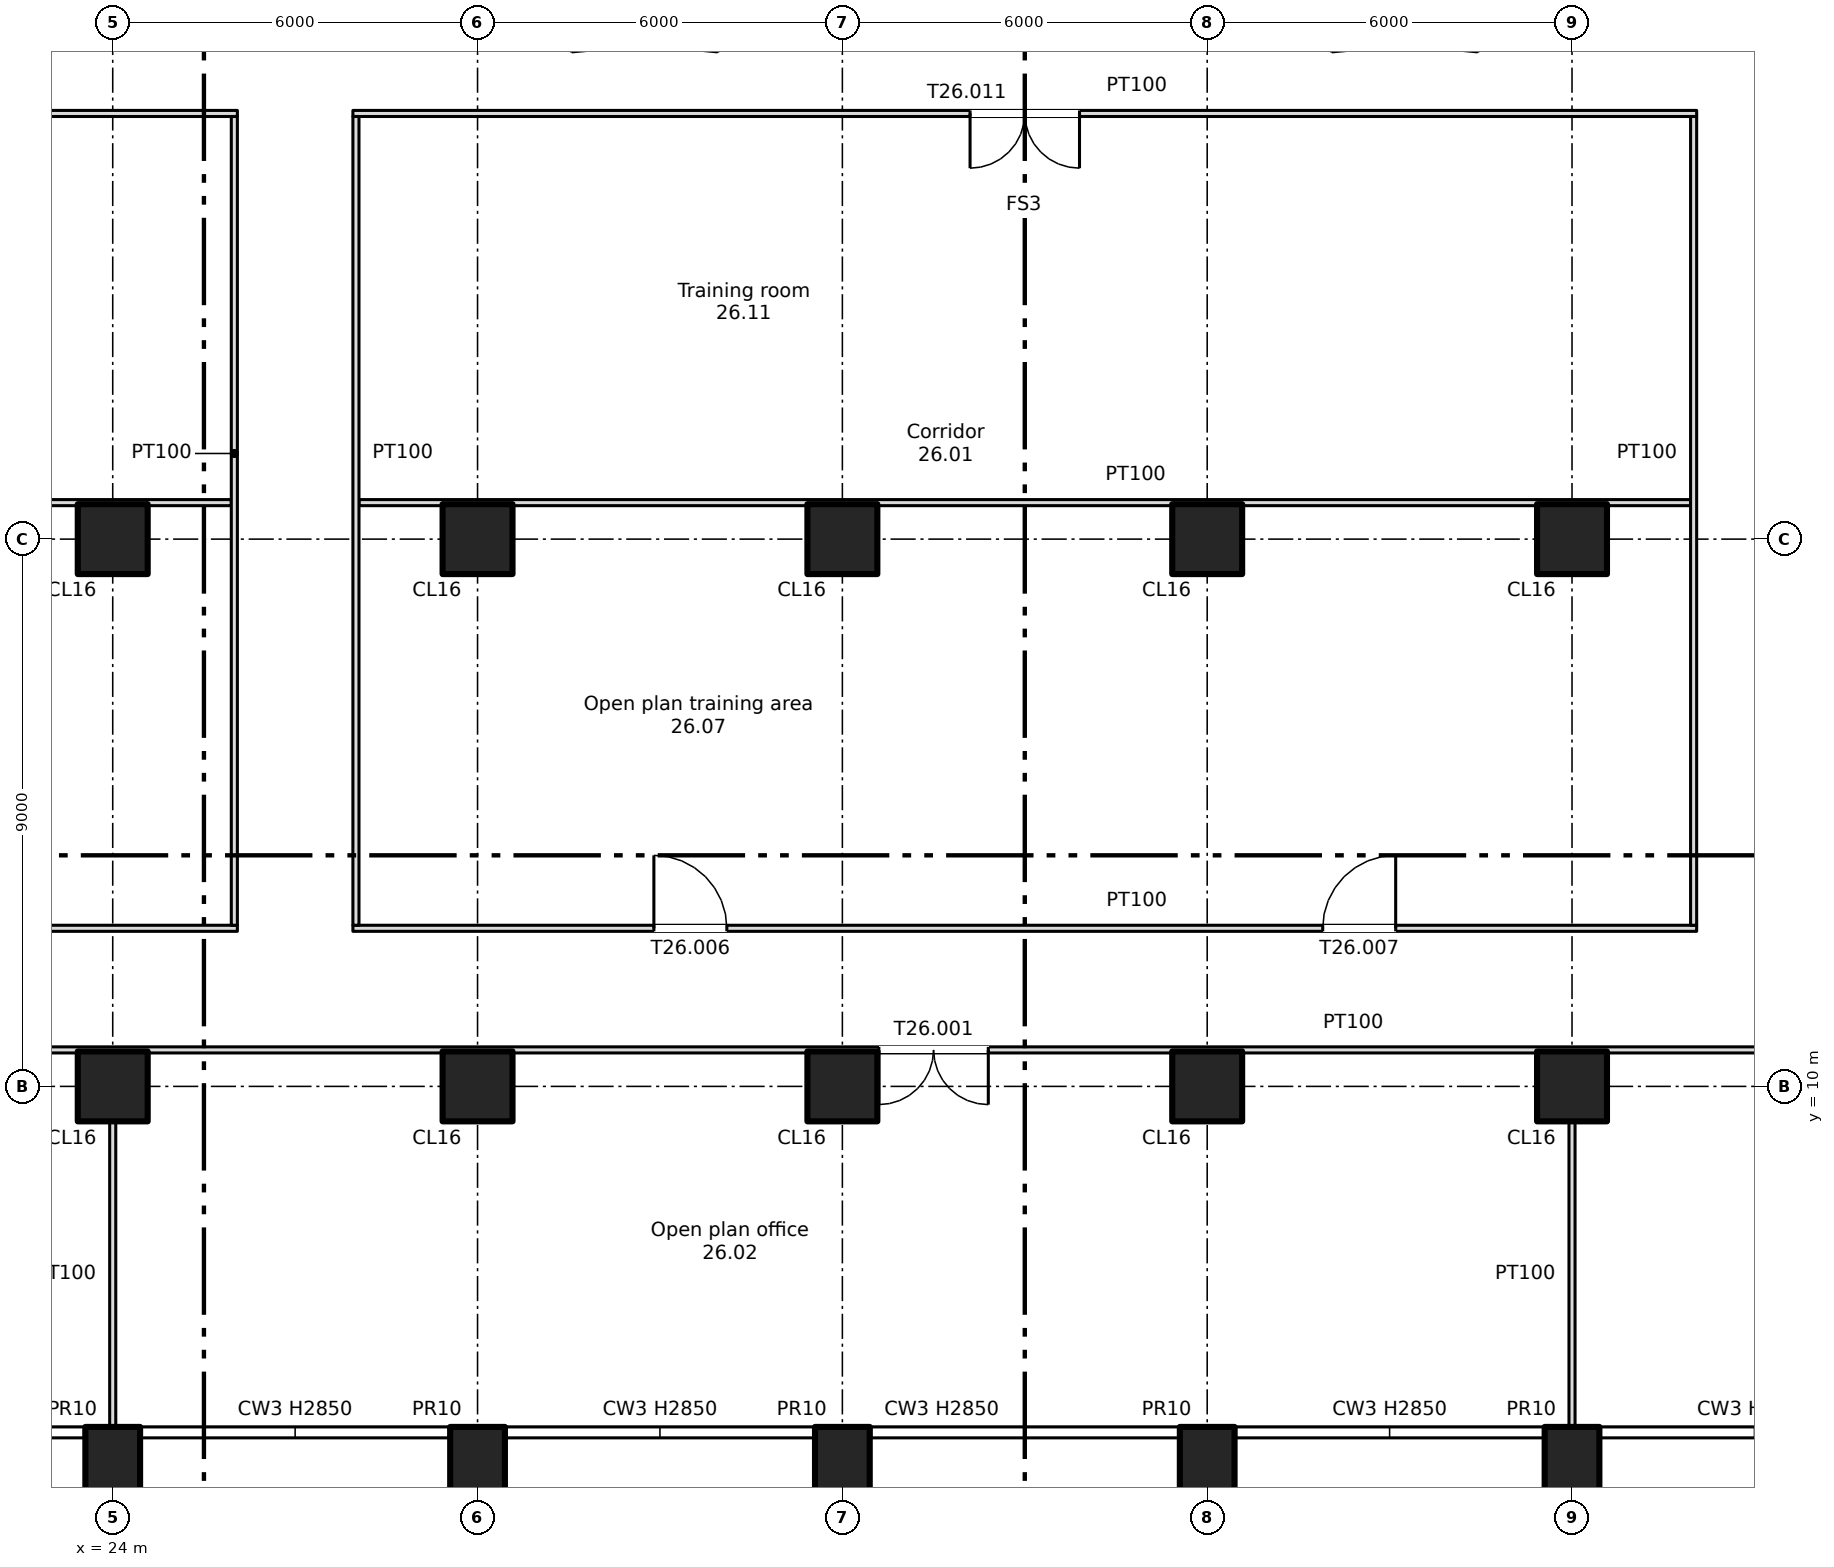
"""IFC4 building model, lengths in metres.
Left out: names, types, materials, properties, quantities, classifications, styles, units other than length and angle.
Written with IfcOpenShell. Run it as: python <this file> out.ifc"""

import sys

from ifc_helpers import new_model, si_unit, direction, frame, frame_2d, origin, origin_2d, place, context, subcontext, project, spatial, rectangle, extrude, element, fill, save


model = new_model("IFC4")
c1 = context("Model", 3, precision=1e-05, world=origin(), true_north=direction((0.0, 1.0)))
c2 = subcontext(c1, "Body", "Model", "MODEL_VIEW")
j1 = project(units=[si_unit("LENGTHUNIT", "METRE"), si_unit("PLANEANGLEUNIT", "RADIAN")], contexts=[c1])
p1 = place(None, origin())
s1 = spatial("IfcSite", under=j1, at=p1, CompositionType="ELEMENT")
p2 = place(p1, origin())
s2 = spatial("IfcBuilding", under=s1, at=p2, CompositionType="ELEMENT")
p3 = place(p2, frame((0.0, 0.0, 181.75)))
s3 = spatial("IfcBuildingStorey", under=s2, at=p3, CompositionType="ELEMENT", Elevation=181.75)
for number, where, z_axis, x_axis in (
    (1, (24.0, 3.7, -0.4), (0.0, 0.0, 1.0), (1.0, 0.0, 0.0)),
    (2, (30.0, 3.7, -0.4), (0.0, 0.0, 1.0), (1.0, 0.0, 0.0)),
    (3, (36.0, 3.7, -0.4), (0.0, 0.0, 1.0), (1.0, 0.0, 0.0)),
    (4, (42.0, 3.7, -0.4), (0.0, 0.0, 1.0), (1.0, 0.0, 0.0)),
    (5, (48.0, 3.7, -0.4), (0.0, 0.0, 1.0), (1.0, 0.0, 0.0)),
):
    element("IfcColumn", number, at=place(p3, frame(where, z_axis=z_axis, x_axis=x_axis)), inside=s3, PredefinedType="COLUMN", context=c2, shape_type="SweptSolid", body=[
        extrude(rectangle(XDim=0.9, YDim=1.4, at=origin_2d()), origin(), (0.0, 0.0, 1.0), 3.75),
    ])
for number, where, z_axis, x_axis in (
    (6, (24.0, 10.0, 0.0), (0.0, 0.0, 1.0), (1.0, 0.0, 0.0)),
    (7, (24.0, 19.0, 0.0), (0.0, 0.0, 1.0), (1.0, 0.0, 0.0)),
    (8, (30.0, 10.0, 0.0), (0.0, 0.0, 1.0), (1.0, 0.0, 0.0)),
    (9, (30.0, 19.0, 0.0), (0.0, 0.0, 1.0), (1.0, 0.0, 0.0)),
    (10, (36.0, 10.0, 0.0), (0.0, 0.0, 1.0), (1.0, 0.0, 0.0)),
    (11, (36.0, 19.0, 0.0), (0.0, 0.0, 1.0), (1.0, 0.0, 0.0)),
    (12, (42.0, 10.0, 0.0), (0.0, 0.0, 1.0), (1.0, 0.0, 0.0)),
    (13, (42.0, 19.0, 0.0), (0.0, 0.0, 1.0), (1.0, 0.0, 0.0)),
    (14, (48.0, 10.0, 0.0), (0.0, 0.0, 1.0), (1.0, 0.0, 0.0)),
    (15, (48.0, 19.0, 0.0), (0.0, 0.0, 1.0), (1.0, 0.0, 0.0)),
):
    element("IfcColumn", number, at=place(p3, frame(where, z_axis=z_axis, x_axis=x_axis)), inside=s3, PredefinedType="COLUMN", context=c2, shape_type="SweptSolid", body=[
        extrude(rectangle(XDim=1.15, YDim=1.15, at=origin_2d()), origin(), (0.0, 0.0, 1.0), 3.35),
    ])
p4 = place(p3, frame((6.6, 10.6, 0.0), z_axis=(0.0, 0.0, 1.0), x_axis=(1.0, 0.0, 0.0)))
e16 = element("IfcWall", 16, at=p4, inside=s3, PredefinedType="PARTITIONING", context=c2, shape_type="SweptSolid", body=[
    extrude(rectangle(XDim=64.8, YDim=0.1, at=frame_2d((32.4, 0.0))), origin(), (0.0, 0.0, 1.0), 3.35),
])
p5 = place(p4, frame((30.0, 0.0, 0.0)))
e17 = element("IfcOpeningElement", 17, at=p5, cuts=e16, PredefinedType="OPENING", context=c2, shape_type="SweptSolid", body=[
    extrude(rectangle(XDim=1.8, YDim=2.1, at=frame_2d((0.9, 1.05))), frame((0.0, 0.06, 0.0), z_axis=(0.0, -1.0, 0.0), x_axis=(1.0, 0.0, 0.0)), (0.0, 0.0, 1.0), 0.12),
])
p6 = place(p4, frame((50.95, 0.0, 0.0)))
e18 = element("IfcOpeningElement", 18, at=p6, cuts=e16, PredefinedType="OPENING", context=c2, shape_type="SweptSolid", body=[
    extrude(rectangle(XDim=1.8, YDim=2.1, at=frame_2d((0.9, 1.05))), frame((0.0, 0.06, 0.0), z_axis=(0.0, -1.0, 0.0), x_axis=(1.0, 0.0, 0.0)), (0.0, 0.0, 1.0), 0.12),
])
p7 = place(p4, frame((7.8, 0.0, 0.0)))
e19 = element("IfcOpeningElement", 19, at=p7, cuts=e16, PredefinedType="OPENING", context=c2, shape_type="SweptSolid", body=[
    extrude(rectangle(XDim=1.8, YDim=2.1, at=frame_2d((0.9, 1.05))), frame((0.0, 0.06, 0.0), z_axis=(0.0, -1.0, 0.0), x_axis=(1.0, 0.0, 0.0)), (0.0, 0.0, 1.0), 0.12),
])
p8 = place(p3, frame((6.6, 12.6, 0.0), z_axis=(0.0, 0.0, 1.0), x_axis=(1.0, 0.0, 0.0)))
e20 = element("IfcWall", 20, at=p8, inside=s3, PredefinedType="PARTITIONING", context=c2, shape_type="SweptSolid", body=[
    extrude(rectangle(XDim=19.45, YDim=0.1, at=frame_2d((9.725, 0.0))), origin(), (0.0, 0.0, 1.0), 3.35),
])
p9 = place(p8, frame((3.7, 0.0, 0.0)))
e21 = element("IfcOpeningElement", 21, at=p9, cuts=e20, PredefinedType="OPENING", context=c2, shape_type="SweptSolid", body=[
    extrude(rectangle(XDim=1.0, YDim=2.1, at=frame_2d((0.5, 1.05))), frame((0.0, 0.06, 0.0), z_axis=(0.0, -1.0, 0.0), x_axis=(1.0, 0.0, 0.0)), (0.0, 0.0, 1.0), 0.12),
])
p10 = place(p8, frame((13.0, 0.0, 0.0)))
e22 = element("IfcOpeningElement", 22, at=p10, cuts=e20, PredefinedType="OPENING", context=c2, shape_type="SweptSolid", body=[
    extrude(rectangle(XDim=1.8, YDim=2.1, at=frame_2d((0.9, 1.05))), frame((0.0, 0.06, 0.0), z_axis=(0.0, -1.0, 0.0), x_axis=(1.0, 0.0, 0.0)), (0.0, 0.0, 1.0), 0.12),
])
p11 = place(p3, frame((27.95, 12.6, 0.0), z_axis=(0.0, 0.0, 1.0), x_axis=(1.0, 0.0, 0.0)))
e23 = element("IfcWall", 23, at=p11, inside=s3, PredefinedType="PARTITIONING", context=c2, shape_type="SweptSolid", body=[
    extrude(rectangle(XDim=22.1, YDim=0.1, at=frame_2d((11.05, 0.0))), origin(), (0.0, 0.0, 1.0), 3.35),
])
p12 = place(p11, frame((4.95, 0.0, 0.0)))
e24 = element("IfcOpeningElement", 24, at=p12, cuts=e23, PredefinedType="OPENING", context=c2, shape_type="SweptSolid", body=[
    extrude(rectangle(XDim=1.2, YDim=2.1, at=frame_2d((0.6, 1.05))), frame((0.0, 0.06, 0.0), z_axis=(0.0, -1.0, 0.0), x_axis=(1.0, 0.0, 0.0)), (0.0, 0.0, 1.0), 0.12),
])
p13 = place(p11, frame((15.95, 0.0, 0.0)))
e25 = element("IfcOpeningElement", 25, at=p13, cuts=e23, PredefinedType="OPENING", context=c2, shape_type="SweptSolid", body=[
    extrude(rectangle(XDim=1.2, YDim=2.1, at=frame_2d((0.6, 1.05))), frame((0.0, 0.06, 0.0), z_axis=(0.0, -1.0, 0.0), x_axis=(1.0, 0.0, 0.0)), (0.0, 0.0, 1.0), 0.12),
])
p14 = place(p3, frame((6.6, 19.6, 0.0), z_axis=(0.0, 0.0, 1.0), x_axis=(1.0, 0.0, 0.0)))
e26 = element("IfcWall", 26, at=p14, inside=s3, PredefinedType="PARTITIONING", context=c2, shape_type="SweptSolid", body=[
    extrude(rectangle(XDim=19.35, YDim=0.1, at=frame_2d((9.675, 0.0))), origin(), (0.0, 0.0, 1.0), 3.35),
])
p15 = place(p3, frame((28.05, 19.6, 0.0), z_axis=(0.0, 0.0, 1.0), x_axis=(1.0, 0.0, 0.0)))
e27 = element("IfcWall", 27, at=p15, inside=s3, PredefinedType="PARTITIONING", context=c2, shape_type="SweptSolid", body=[
    extrude(rectangle(XDim=21.9, YDim=0.1, at=frame_2d((10.95, 0.0))), origin(), (0.0, 0.0, 1.0), 3.35),
])
p16 = place(p3, frame((6.6, 26.0, 0.0), z_axis=(0.0, 0.0, 1.0), x_axis=(1.0, 0.0, 0.0)))
e28 = element("IfcWall", 28, at=p16, inside=s3, PredefinedType="PARTITIONING", context=c2, shape_type="SweptSolid", body=[
    extrude(rectangle(XDim=19.45, YDim=0.1, at=frame_2d((9.725, 0.0))), origin(), (0.0, 0.0, 1.0), 3.35),
])
p17 = place(p16, frame((3.7, 0.0, 0.0)))
e29 = element("IfcOpeningElement", 29, at=p17, cuts=e28, PredefinedType="OPENING", context=c2, shape_type="SweptSolid", body=[
    extrude(rectangle(XDim=1.0, YDim=2.1, at=frame_2d((0.5, 1.05))), frame((0.0, 0.06, 0.0), z_axis=(0.0, -1.0, 0.0), x_axis=(1.0, 0.0, 0.0)), (0.0, 0.0, 1.0), 0.12),
])
p18 = place(p16, frame((13.0, 0.0, 0.0)))
e30 = element("IfcOpeningElement", 30, at=p18, cuts=e28, PredefinedType="OPENING", context=c2, shape_type="SweptSolid", body=[
    extrude(rectangle(XDim=1.8, YDim=2.1, at=frame_2d((0.9, 1.05))), frame((0.0, 0.06, 0.0), z_axis=(0.0, -1.0, 0.0), x_axis=(1.0, 0.0, 0.0)), (0.0, 0.0, 1.0), 0.12),
])
p19 = place(p3, frame((27.95, 26.0, 0.0), z_axis=(0.0, 0.0, 1.0), x_axis=(1.0, 0.0, 0.0)))
e31 = element("IfcWall", 31, at=p19, inside=s3, PredefinedType="PARTITIONING", context=c2, shape_type="SweptSolid", body=[
    extrude(rectangle(XDim=22.1, YDim=0.1, at=frame_2d((11.05, 0.0))), origin(), (0.0, 0.0, 1.0), 3.35),
])
p20 = place(p19, frame((10.15, 0.0, 0.0)))
e32 = element("IfcOpeningElement", 32, at=p20, cuts=e31, PredefinedType="OPENING", context=c2, shape_type="SweptSolid", body=[
    extrude(rectangle(XDim=1.8, YDim=2.1, at=frame_2d((0.9, 1.05))), frame((0.0, 0.06, 0.0), z_axis=(0.0, -1.0, 0.0), x_axis=(1.0, 0.0, 0.0)), (0.0, 0.0, 1.0), 0.12),
])
p21 = place(p3, frame((24.0, 4.4, 0.0), z_axis=(0.0, 0.0, 1.0), x_axis=(0.0, 1.0, 0.0)))
e33 = element("IfcWall", 33, at=p21, inside=s3, PredefinedType="PARTITIONING", context=c2, shape_type="SweptSolid", body=[
    extrude(rectangle(XDim=5.025, YDim=0.1, at=frame_2d((2.513, 0.0))), origin(), (0.0, 0.0, 1.0), 3.35),
])
for number, where, z_axis, x_axis in (
    (34, (26.0, 12.65, 0.0), (0.0, 0.0, 1.0), (0.0, 1.0, 0.0)),
    (35, (28.0, 12.65, 0.0), (0.0, 0.0, 1.0), (0.0, 1.0, 0.0)),
):
    element("IfcWall", number, at=place(p3, frame(where, z_axis=z_axis, x_axis=x_axis)), inside=s3, PredefinedType="PARTITIONING", context=c2, shape_type="SweptSolid", body=[
        extrude(rectangle(XDim=13.3, YDim=0.1, at=frame_2d((6.65, 0.0))), origin(), (0.0, 0.0, 1.0), 3.35),
    ])
p22 = place(p3, frame((48.0, 4.4, 0.0), z_axis=(0.0, 0.0, 1.0), x_axis=(0.0, 1.0, 0.0)))
e36 = element("IfcWall", 36, at=p22, inside=s3, PredefinedType="PARTITIONING", context=c2, shape_type="SweptSolid", body=[
    extrude(rectangle(XDim=5.025, YDim=0.1, at=frame_2d((2.513, 0.0))), origin(), (0.0, 0.0, 1.0), 3.35),
])
p23 = place(p3, frame((50.0, 12.65, 0.0), z_axis=(0.0, 0.0, 1.0), x_axis=(0.0, 1.0, 0.0)))
e37 = element("IfcWall", 37, at=p23, inside=s3, PredefinedType="PARTITIONING", context=c2, shape_type="SweptSolid", body=[
    extrude(rectangle(XDim=13.3, YDim=0.1, at=frame_2d((6.65, 0.0))), origin(), (0.0, 0.0, 1.0), 3.35),
])
p24 = place(p5, origin())
e38 = element("IfcDoor", 38, at=p24, inside=s3, OperationType="DOUBLE_DOOR_SINGLE_SWING", PredefinedType="DOOR", context=c2, shape_type="SweptSolid", body=[
    extrude(rectangle(XDim=1.8, YDim=2.1, at=frame_2d((0.9, 1.05))), frame((0.0, 0.025, 0.0), z_axis=(0.0, -1.0, 0.0), x_axis=(1.0, 0.0, 0.0)), (0.0, 0.0, 1.0), 0.05),
])
fill(e17, e38)
p25 = place(p12, origin())
e39 = element("IfcDoor", 39, at=p25, inside=s3, OperationType="SINGLE_SWING_LEFT", PredefinedType="DOOR", context=c2, shape_type="SweptSolid", body=[
    extrude(rectangle(XDim=1.2, YDim=2.1, at=frame_2d((0.6, 1.05))), frame((0.0, 0.025, 0.0), z_axis=(0.0, -1.0, 0.0), x_axis=(1.0, 0.0, 0.0)), (0.0, 0.0, 1.0), 0.05),
])
fill(e24, e39)
p26 = place(p13, origin())
e40 = element("IfcDoor", 40, at=p26, inside=s3, OperationType="SINGLE_SWING_RIGHT", PredefinedType="DOOR", context=c2, shape_type="SweptSolid", body=[
    extrude(rectangle(XDim=1.2, YDim=2.1, at=frame_2d((0.6, 1.05))), frame((0.0, 0.025, 0.0), z_axis=(0.0, -1.0, 0.0), x_axis=(1.0, 0.0, 0.0)), (0.0, 0.0, 1.0), 0.05),
])
fill(e25, e40)
p27 = place(p20, origin())
e41 = element("IfcDoor", 41, at=p27, inside=s3, OperationType="DOUBLE_DOOR_SINGLE_SWING", PredefinedType="DOOR", context=c2, shape_type="SweptSolid", body=[
    extrude(rectangle(XDim=1.8, YDim=2.1, at=frame_2d((0.9, 1.05))), frame((0.0, 0.025, 0.0), z_axis=(0.0, -1.0, 0.0), x_axis=(1.0, 0.0, 0.0)), (0.0, 0.0, 1.0), 0.05),
])
fill(e32, e41)
save(model, sys.argv[1])
